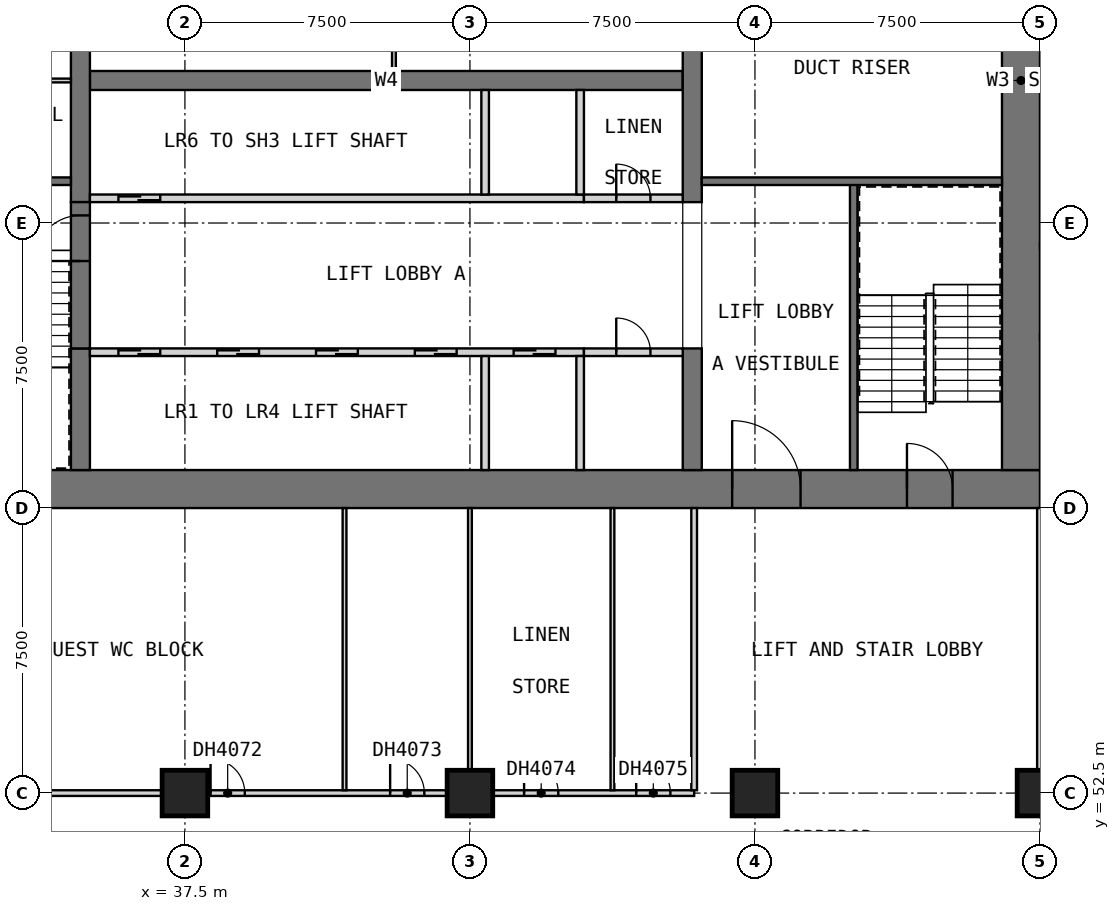
"""IFC4 building model, lengths in metres.
Left out: names, types, materials, properties, quantities, classifications, styles, units other than length and angle.
Written with IfcOpenShell. Run it as: python <this file> out.ifc"""

import sys

from ifc_helpers import new_model, si_unit, direction, frame, frame_2d, origin, origin_2d, place, context, subcontext, project, spatial, rectangle, extrude, element, fill, save


model = new_model("IFC4")
c1 = context("Model", 3, precision=1e-05, world=origin(), true_north=direction((0.0, 1.0)))
c2 = subcontext(c1, "Body", "Model", "MODEL_VIEW")
j1 = project(units=[si_unit("LENGTHUNIT", "METRE"), si_unit("PLANEANGLEUNIT", "RADIAN")], contexts=[c1])
p1 = place(None, origin())
s1 = spatial("IfcSite", under=j1, at=p1, CompositionType="ELEMENT")
p2 = place(p1, origin())
s2 = spatial("IfcBuilding", under=s1, at=p2, CompositionType="ELEMENT")
p3 = place(p2, frame((0.0, 0.0, 44.8)))
s3 = spatial("IfcBuildingStorey", under=s2, at=p3, CompositionType="ELEMENT", Elevation=44.8)
for number, where, z_axis, x_axis in (
    (1, (37.5, 52.5, 0.0), (0.0, 0.0, 1.0), (1.0, 0.0, 0.0)),
    (2, (45.0, 52.5, 0.0), (0.0, 0.0, 1.0), (1.0, 0.0, 0.0)),
    (3, (52.5, 52.5, 0.0), (0.0, 0.0, 1.0), (1.0, 0.0, 0.0)),
    (4, (60.0, 52.5, 0.0), (0.0, 0.0, 1.0), (1.0, 0.0, 0.0)),
):
    element("IfcColumn", number, at=place(p3, frame(where, z_axis=z_axis, x_axis=x_axis)), inside=s3, PredefinedType="COLUMN", context=c2, shape_type="SweptSolid", body=[
        extrude(rectangle(XDim=1.2, YDim=1.2, at=origin_2d()), origin(), (0.0, 0.0, 1.0), 3.6),
    ])
p4 = place(p3, frame((30.0, 60.5, 0.0), z_axis=(0.0, 0.0, 1.0), x_axis=(1.0, 0.0, 0.0)))
e5 = element("IfcWall", 5, at=p4, inside=s3, PredefinedType="SHEAR", context=c2, shape_type="SweptSolid", body=[
    extrude(rectangle(XDim=30.0, YDim=1.0, at=frame_2d((15.0, 0.0))), origin(), (0.0, 0.0, 1.0), 3.6),
])
p5 = place(p4, frame((21.9, 0.0, 0.0)))
e6 = element("IfcOpeningElement", 6, at=p5, cuts=e5, PredefinedType="OPENING", context=c2, shape_type="SweptSolid", body=[
    extrude(rectangle(XDim=1.8, YDim=2.1, at=frame_2d((0.9, 1.05))), frame((0.0, 0.51, 0.0), z_axis=(0.0, -1.0, 0.0), x_axis=(1.0, 0.0, 0.0)), (0.0, 0.0, 1.0), 1.02),
])
p6 = place(p4, frame((26.5, 0.0, 0.0)))
e7 = element("IfcOpeningElement", 7, at=p6, cuts=e5, PredefinedType="OPENING", context=c2, shape_type="SweptSolid", body=[
    extrude(rectangle(XDim=1.2, YDim=2.1, at=frame_2d((0.6, 1.05))), frame((0.0, 0.51, 0.0), z_axis=(0.0, -1.0, 0.0), x_axis=(1.0, 0.0, 0.0)), (0.0, 0.0, 1.0), 1.02),
])
p7 = place(p3, frame((59.5, 61.0, 0.0), z_axis=(0.0, 0.0, 1.0), x_axis=(0.0, 1.0, 0.0)))
e8 = element("IfcWall", 8, at=p7, inside=s3, PredefinedType="SHEAR", context=c2, shape_type="SweptSolid", body=[
    extrude(rectangle(XDim=20.5, YDim=1.0, at=frame_2d((10.25, 0.0))), origin(), (0.0, 0.0, 1.0), 3.6),
])
p8 = place(p7, frame((14.5, 0.0, 0.0)))
e9 = element("IfcOpeningElement", 9, at=p8, cuts=e8, PredefinedType="OPENING", context=c2, shape_type="SweptSolid", body=[
    extrude(rectangle(XDim=1.8, YDim=2.1, at=frame_2d((0.9, 1.05))), frame((0.0, 0.51, 0.0), z_axis=(0.0, -1.0, 0.0), x_axis=(1.0, 0.0, 0.0)), (0.0, 0.0, 1.0), 1.02),
])
p9 = place(p3, frame((35.0, 71.25, 0.0), z_axis=(0.0, 0.0, 1.0), x_axis=(1.0, 0.0, 0.0)))
e10 = element("IfcWall", 10, at=p9, inside=s3, PredefinedType="SHEAR", context=c2, shape_type="SweptSolid", body=[
    extrude(rectangle(XDim=15.6, YDim=0.5, at=frame_2d((7.8, 0.0))), origin(), (0.0, 0.0, 1.0), 3.6),
])
p10 = place(p3, frame((34.75, 61.0, 0.0), z_axis=(0.0, 0.0, 1.0), x_axis=(0.0, 1.0, 0.0)))
e11 = element("IfcWall", 11, at=p10, inside=s3, PredefinedType="SHEAR", context=c2, shape_type="SweptSolid", body=[
    extrude(rectangle(XDim=3.2, YDim=0.5, at=frame_2d((1.6, 0.0))), origin(), (0.0, 0.0, 1.0), 3.6),
])
p11 = place(p3, frame((34.75, 68.05, 0.0), z_axis=(0.0, 0.0, 1.0), x_axis=(0.0, 1.0, 0.0)))
e12 = element("IfcWall", 12, at=p11, inside=s3, PredefinedType="SHEAR", context=c2, shape_type="SweptSolid", body=[
    extrude(rectangle(XDim=6.4, YDim=0.5, at=frame_2d((3.2, 0.0))), origin(), (0.0, 0.0, 1.0), 3.6),
])
p12 = place(p3, frame((50.85, 61.0, 0.0), z_axis=(0.0, 0.0, 1.0), x_axis=(0.0, 1.0, 0.0)))
e13 = element("IfcWall", 13, at=p12, inside=s3, PredefinedType="SHEAR", context=c2, shape_type="SweptSolid", body=[
    extrude(rectangle(XDim=3.2, YDim=0.5, at=frame_2d((1.6, 0.0))), origin(), (0.0, 0.0, 1.0), 3.6),
])
p13 = place(p3, frame((50.85, 68.05, 0.0), z_axis=(0.0, 0.0, 1.0), x_axis=(0.0, 1.0, 0.0)))
e14 = element("IfcWall", 14, at=p13, inside=s3, PredefinedType="SHEAR", context=c2, shape_type="SweptSolid", body=[
    extrude(rectangle(XDim=6.4, YDim=0.5, at=frame_2d((3.2, 0.0))), origin(), (0.0, 0.0, 1.0), 3.6),
])
p14 = place(p3, frame((35.0, 64.1, 0.0), z_axis=(0.0, 0.0, 1.0), x_axis=(1.0, 0.0, 0.0)))
e15 = element("IfcWall", 15, at=p14, inside=s3, PredefinedType="SOLIDWALL", context=c2, shape_type="SweptSolid", body=[
    extrude(rectangle(XDim=13.0, YDim=0.2, at=frame_2d((6.5, 0.0))), origin(), (0.0, 0.0, 1.0), 3.6),
])
p15 = place(p14, frame((0.75, 0.0, 0.0)))
e16 = element("IfcOpeningElement", 16, at=p15, cuts=e15, PredefinedType="OPENING", context=c2, shape_type="SweptSolid", body=[
    extrude(rectangle(XDim=1.1, YDim=2.1, at=frame_2d((0.55, 1.05))), frame((0.0, 0.11, 0.0), z_axis=(0.0, -1.0, 0.0), x_axis=(1.0, 0.0, 0.0)), (0.0, 0.0, 1.0), 0.22),
])
p16 = place(p14, frame((3.35, 0.0, 0.0)))
e17 = element("IfcOpeningElement", 17, at=p16, cuts=e15, PredefinedType="OPENING", context=c2, shape_type="SweptSolid", body=[
    extrude(rectangle(XDim=1.1, YDim=2.1, at=frame_2d((0.55, 1.05))), frame((0.0, 0.11, 0.0), z_axis=(0.0, -1.0, 0.0), x_axis=(1.0, 0.0, 0.0)), (0.0, 0.0, 1.0), 0.22),
])
p17 = place(p14, frame((5.95, 0.0, 0.0)))
e18 = element("IfcOpeningElement", 18, at=p17, cuts=e15, PredefinedType="OPENING", context=c2, shape_type="SweptSolid", body=[
    extrude(rectangle(XDim=1.1, YDim=2.1, at=frame_2d((0.55, 1.05))), frame((0.0, 0.11, 0.0), z_axis=(0.0, -1.0, 0.0), x_axis=(1.0, 0.0, 0.0)), (0.0, 0.0, 1.0), 0.22),
])
p18 = place(p14, frame((8.55, 0.0, 0.0)))
e19 = element("IfcOpeningElement", 19, at=p18, cuts=e15, PredefinedType="OPENING", context=c2, shape_type="SweptSolid", body=[
    extrude(rectangle(XDim=1.1, YDim=2.1, at=frame_2d((0.55, 1.05))), frame((0.0, 0.11, 0.0), z_axis=(0.0, -1.0, 0.0), x_axis=(1.0, 0.0, 0.0)), (0.0, 0.0, 1.0), 0.22),
])
p19 = place(p14, frame((11.15, 0.0, 0.0)))
e20 = element("IfcOpeningElement", 20, at=p19, cuts=e15, PredefinedType="OPENING", context=c2, shape_type="SweptSolid", body=[
    extrude(rectangle(XDim=1.1, YDim=2.1, at=frame_2d((0.55, 1.05))), frame((0.0, 0.11, 0.0), z_axis=(0.0, -1.0, 0.0), x_axis=(1.0, 0.0, 0.0)), (0.0, 0.0, 1.0), 0.22),
])
for number, where, z_axis, x_axis in (
    (21, (45.4, 61.0, 0.0), (0.0, 0.0, 1.0), (0.0, 1.0, 0.0)),
    (22, (47.9, 61.0, 0.0), (0.0, 0.0, 1.0), (0.0, 1.0, 0.0)),
):
    element("IfcWall", number, at=place(p3, frame(where, z_axis=z_axis, x_axis=x_axis)), inside=s3, PredefinedType="SOLIDWALL", context=c2, shape_type="SweptSolid", body=[
        extrude(rectangle(XDim=3.0, YDim=0.2, at=frame_2d((1.5, 0.0))), origin(), (0.0, 0.0, 1.0), 3.6),
    ])
p20 = place(p3, frame((48.0, 64.1, 0.0), z_axis=(0.0, 0.0, 1.0), x_axis=(1.0, 0.0, 0.0)))
e23 = element("IfcWall", 23, at=p20, inside=s3, PredefinedType="PARTITIONING", context=c2, shape_type="SweptSolid", body=[
    extrude(rectangle(XDim=2.6, YDim=0.2, at=frame_2d((1.3, 0.0))), origin(), (0.0, 0.0, 1.0), 3.35),
])
p21 = place(p20, frame((0.85, 0.0, 0.0)))
e24 = element("IfcOpeningElement", 24, at=p21, cuts=e23, PredefinedType="OPENING", context=c2, shape_type="SweptSolid", body=[
    extrude(rectangle(XDim=0.9, YDim=2.1, at=frame_2d((0.45, 1.05))), frame((0.0, 0.11, 0.0), z_axis=(0.0, -1.0, 0.0), x_axis=(1.0, 0.0, 0.0)), (0.0, 0.0, 1.0), 0.22),
])
p22 = place(p3, frame((35.0, 68.15, 0.0), z_axis=(0.0, 0.0, 1.0), x_axis=(1.0, 0.0, 0.0)))
e25 = element("IfcWall", 25, at=p22, inside=s3, PredefinedType="SOLIDWALL", context=c2, shape_type="SweptSolid", body=[
    extrude(rectangle(XDim=13.0, YDim=0.2, at=frame_2d((6.5, 0.0))), origin(), (0.0, 0.0, 1.0), 3.6),
])
p23 = place(p22, frame((0.75, 0.0, 0.0)))
e26 = element("IfcOpeningElement", 26, at=p23, cuts=e25, PredefinedType="OPENING", context=c2, shape_type="SweptSolid", body=[
    extrude(rectangle(XDim=1.1, YDim=2.1, at=frame_2d((0.55, 1.05))), frame((0.0, 0.11, 0.0), z_axis=(0.0, -1.0, 0.0), x_axis=(1.0, 0.0, 0.0)), (0.0, 0.0, 1.0), 0.22),
])
for number, where, z_axis, x_axis in (
    (27, (45.4, 68.25, 0.0), (0.0, 0.0, 1.0), (0.0, 1.0, 0.0)),
    (28, (47.9, 68.25, 0.0), (0.0, 0.0, 1.0), (0.0, 1.0, 0.0)),
):
    element("IfcWall", number, at=place(p3, frame(where, z_axis=z_axis, x_axis=x_axis)), inside=s3, PredefinedType="SOLIDWALL", context=c2, shape_type="SweptSolid", body=[
        extrude(rectangle(XDim=2.75, YDim=0.2, at=frame_2d((1.375, 0.0))), origin(), (0.0, 0.0, 1.0), 3.6),
    ])
p24 = place(p3, frame((48.0, 68.15, 0.0), z_axis=(0.0, 0.0, 1.0), x_axis=(1.0, 0.0, 0.0)))
e29 = element("IfcWall", 29, at=p24, inside=s3, PredefinedType="PARTITIONING", context=c2, shape_type="SweptSolid", body=[
    extrude(rectangle(XDim=2.6, YDim=0.2, at=frame_2d((1.3, 0.0))), origin(), (0.0, 0.0, 1.0), 3.35),
])
p25 = place(p24, frame((0.85, 0.0, 0.0)))
e30 = element("IfcOpeningElement", 30, at=p25, cuts=e29, PredefinedType="OPENING", context=c2, shape_type="SweptSolid", body=[
    extrude(rectangle(XDim=0.9, YDim=2.1, at=frame_2d((0.45, 1.05))), frame((0.0, 0.11, 0.0), z_axis=(0.0, -1.0, 0.0), x_axis=(1.0, 0.0, 0.0)), (0.0, 0.0, 1.0), 0.22),
])
p26 = place(p3, frame((43.0, 71.5, 0.0), z_axis=(0.0, 0.0, 1.0), x_axis=(0.0, 1.0, 0.0)))
e31 = element("IfcWall", 31, at=p26, inside=s3, PredefinedType="PARTITIONING", context=c2, shape_type="SweptSolid", body=[
    extrude(rectangle(XDim=2.0, YDim=0.1, at=frame_2d((1.0, 0.0))), origin(), (0.0, 0.0, 1.0), 3.35),
])
p27 = place(p3, frame((34.75, 64.2, 0.0), z_axis=(0.0, 0.0, 1.0), x_axis=(0.0, 1.0, 0.0)))
e32 = element("IfcWall", 32, at=p27, inside=s3, PredefinedType="SOLIDWALL", context=c2, shape_type="SweptSolid", body=[
    extrude(rectangle(XDim=3.85, YDim=0.5, at=frame_2d((1.925, 0.0))), origin(), (0.0, 0.0, 1.0), 2.4),
])
p28 = place(p27, frame((2.3, 0.0, 0.0)))
e33 = element("IfcOpeningElement", 33, at=p28, cuts=e32, PredefinedType="OPENING", context=c2, shape_type="SweptSolid", body=[
    extrude(rectangle(XDim=1.2, YDim=2.1, at=frame_2d((0.6, 1.05))), frame((0.0, 0.26, 0.0), z_axis=(0.0, -1.0, 0.0), x_axis=(1.0, 0.0, 0.0)), (0.0, 0.0, 1.0), 0.52),
])
p29 = place(p3, frame((31.0, 68.6, 0.0), z_axis=(0.0, 0.0, 1.0), x_axis=(1.0, 0.0, 0.0)))
e34 = element("IfcWall", 34, at=p29, inside=s3, PredefinedType="SOLIDWALL", context=c2, shape_type="SweptSolid", body=[
    extrude(rectangle(XDim=3.5, YDim=0.2, at=frame_2d((1.75, 0.0))), origin(), (0.0, 0.0, 1.0), 3.35),
])
p30 = place(p29, frame((1.3, 0.0, 0.0)))
e35 = element("IfcOpeningElement", 35, at=p30, cuts=e34, PredefinedType="OPENING", context=c2, shape_type="SweptSolid", body=[
    extrude(rectangle(XDim=0.9, YDim=2.1, at=frame_2d((0.45, 1.05))), frame((0.0, 0.11, 0.0), z_axis=(0.0, -1.0, 0.0), x_axis=(1.0, 0.0, 0.0)), (0.0, 0.0, 1.0), 0.22),
])
p31 = place(p3, frame((55.1, 61.0, 0.0), z_axis=(0.0, 0.0, 1.0), x_axis=(0.0, 1.0, 0.0)))
e36 = element("IfcWall", 36, at=p31, inside=s3, PredefinedType="SOLIDWALL", context=c2, shape_type="SweptSolid", body=[
    extrude(rectangle(XDim=7.6, YDim=0.2, at=frame_2d((3.8, 0.0))), origin(), (0.0, 0.0, 1.0), 3.35),
])
p32 = place(p3, frame((51.1, 68.6, 0.0), z_axis=(0.0, 0.0, 1.0), x_axis=(1.0, 0.0, 0.0)))
e37 = element("IfcWall", 37, at=p32, inside=s3, PredefinedType="SOLIDWALL", context=c2, shape_type="SweptSolid", body=[
    extrude(rectangle(XDim=7.9, YDim=0.2, at=frame_2d((3.95, 0.0))), origin(), (0.0, 0.0, 1.0), 3.35),
])
p33 = place(p3, frame((31.0, 71.25, 0.0), z_axis=(0.0, 0.0, 1.0), x_axis=(1.0, 0.0, 0.0)))
e38 = element("IfcWall", 38, at=p33, inside=s3, PredefinedType="PARTITIONING", context=c2, shape_type="SweptSolid", body=[
    extrude(rectangle(XDim=3.5, YDim=0.1, at=frame_2d((1.75, 0.0))), origin(), (0.0, 0.0, 1.0), 3.35),
])
p34 = place(p3, frame((33.75, 52.5, 0.0), z_axis=(0.0, 0.0, 1.0), x_axis=(1.0, 0.0, 0.0)))
e39 = element("IfcWall", 39, at=p34, inside=s3, PredefinedType="PARTITIONING", context=c2, shape_type="SweptSolid", body=[
    extrude(rectangle(XDim=17.15, YDim=0.15, at=frame_2d((8.575, 0.0))), origin(), (0.0, 0.0, 1.0), 3.35),
])
p35 = place(p34, frame((4.425, 0.0, 0.0)))
e40 = element("IfcOpeningElement", 40, at=p35, cuts=e39, PredefinedType="OPENING", context=c2, shape_type="SweptSolid", body=[
    extrude(rectangle(XDim=0.9, YDim=2.1, at=frame_2d((0.45, 1.05))), frame((0.0, 0.085, 0.0), z_axis=(0.0, -1.0, 0.0), x_axis=(1.0, 0.0, 0.0)), (0.0, 0.0, 1.0), 0.17),
])
p36 = place(p34, frame((9.15, 0.0, 0.0)))
e41 = element("IfcOpeningElement", 41, at=p36, cuts=e39, PredefinedType="OPENING", context=c2, shape_type="SweptSolid", body=[
    extrude(rectangle(XDim=0.9, YDim=2.1, at=frame_2d((0.45, 1.05))), frame((0.0, 0.085, 0.0), z_axis=(0.0, -1.0, 0.0), x_axis=(1.0, 0.0, 0.0)), (0.0, 0.0, 1.0), 0.17),
])
p37 = place(p34, frame((12.675, 0.0, 0.0)))
e42 = element("IfcOpeningElement", 42, at=p37, cuts=e39, PredefinedType="OPENING", context=c2, shape_type="SweptSolid", body=[
    extrude(rectangle(XDim=0.9, YDim=2.1, at=frame_2d((0.45, 1.05))), frame((0.0, 0.085, 0.0), z_axis=(0.0, -1.0, 0.0), x_axis=(1.0, 0.0, 0.0)), (0.0, 0.0, 1.0), 0.17),
])
p38 = place(p34, frame((15.625, 0.0, 0.0)))
e43 = element("IfcOpeningElement", 43, at=p38, cuts=e39, PredefinedType="OPENING", context=c2, shape_type="SweptSolid", body=[
    extrude(rectangle(XDim=0.9, YDim=2.1, at=frame_2d((0.45, 1.05))), frame((0.0, 0.085, 0.0), z_axis=(0.0, -1.0, 0.0), x_axis=(1.0, 0.0, 0.0)), (0.0, 0.0, 1.0), 0.17),
])
for number, where, z_axis, x_axis in (
    (44, (41.7, 52.575, 0.0), (0.0, 0.0, 1.0), (0.0, 1.0, 0.0)),
    (45, (45.0, 52.575, 0.0), (0.0, 0.0, 1.0), (0.0, 1.0, 0.0)),
    (46, (48.75, 52.575, 0.0), (0.0, 0.0, 1.0), (0.0, 1.0, 0.0)),
):
    element("IfcWall", number, at=place(p3, frame(where, z_axis=z_axis, x_axis=x_axis)), inside=s3, PredefinedType="PARTITIONING", context=c2, shape_type="SweptSolid", body=[
        extrude(rectangle(XDim=7.425, YDim=0.1, at=frame_2d((3.712, 0.0))), origin(), (0.0, 0.0, 1.0), 3.35),
    ])
for number, where, z_axis, x_axis in (
    (47, (50.9, 52.575, 0.0), (0.0, 0.0, 1.0), (0.0, 1.0, 0.0)),
    (48, (60.0, 52.575, 0.0), (0.0, 0.0, 1.0), (0.0, 1.0, 0.0)),
):
    element("IfcWall", number, at=place(p3, frame(where, z_axis=z_axis, x_axis=x_axis)), inside=s3, PredefinedType="PARTITIONING", context=c2, shape_type="SweptSolid", body=[
        extrude(rectangle(XDim=7.425, YDim=0.15, at=frame_2d((3.712, 0.0))), origin(), (0.0, 0.0, 1.0), 3.35),
    ])
p39 = place(p15, origin())
e49 = element("IfcDoor", 49, at=p39, inside=s3, OperationType="DOUBLE_DOOR_SLIDING", PredefinedType="DOOR", context=c2, shape_type="SweptSolid", body=[
    extrude(rectangle(XDim=1.1, YDim=2.1, at=frame_2d((0.55, 1.05))), frame((0.0, 0.025, 0.0), z_axis=(0.0, -1.0, 0.0), x_axis=(1.0, 0.0, 0.0)), (0.0, 0.0, 1.0), 0.05),
])
fill(e16, e49)
p40 = place(p16, origin())
e50 = element("IfcDoor", 50, at=p40, inside=s3, OperationType="DOUBLE_DOOR_SLIDING", PredefinedType="DOOR", context=c2, shape_type="SweptSolid", body=[
    extrude(rectangle(XDim=1.1, YDim=2.1, at=frame_2d((0.55, 1.05))), frame((0.0, 0.025, 0.0), z_axis=(0.0, -1.0, 0.0), x_axis=(1.0, 0.0, 0.0)), (0.0, 0.0, 1.0), 0.05),
])
fill(e17, e50)
p41 = place(p17, origin())
e51 = element("IfcDoor", 51, at=p41, inside=s3, OperationType="DOUBLE_DOOR_SLIDING", PredefinedType="DOOR", context=c2, shape_type="SweptSolid", body=[
    extrude(rectangle(XDim=1.1, YDim=2.1, at=frame_2d((0.55, 1.05))), frame((0.0, 0.025, 0.0), z_axis=(0.0, -1.0, 0.0), x_axis=(1.0, 0.0, 0.0)), (0.0, 0.0, 1.0), 0.05),
])
fill(e18, e51)
p42 = place(p18, origin())
e52 = element("IfcDoor", 52, at=p42, inside=s3, OperationType="DOUBLE_DOOR_SLIDING", PredefinedType="DOOR", context=c2, shape_type="SweptSolid", body=[
    extrude(rectangle(XDim=1.1, YDim=2.1, at=frame_2d((0.55, 1.05))), frame((0.0, 0.025, 0.0), z_axis=(0.0, -1.0, 0.0), x_axis=(1.0, 0.0, 0.0)), (0.0, 0.0, 1.0), 0.05),
])
fill(e19, e52)
p43 = place(p19, origin())
e53 = element("IfcDoor", 53, at=p43, inside=s3, OperationType="DOUBLE_DOOR_SLIDING", PredefinedType="DOOR", context=c2, shape_type="SweptSolid", body=[
    extrude(rectangle(XDim=1.1, YDim=2.1, at=frame_2d((0.55, 1.05))), frame((0.0, 0.025, 0.0), z_axis=(0.0, -1.0, 0.0), x_axis=(1.0, 0.0, 0.0)), (0.0, 0.0, 1.0), 0.05),
])
fill(e20, e53)
p44 = place(p21, origin())
e54 = element("IfcDoor", 54, at=p44, inside=s3, OperationType="SINGLE_SWING_LEFT", PredefinedType="DOOR", context=c2, shape_type="SweptSolid", body=[
    extrude(rectangle(XDim=0.9, YDim=2.1, at=frame_2d((0.45, 1.05))), frame((0.0, 0.025, 0.0), z_axis=(0.0, -1.0, 0.0), x_axis=(1.0, 0.0, 0.0)), (0.0, 0.0, 1.0), 0.05),
])
fill(e24, e54)
p45 = place(p23, origin())
e55 = element("IfcDoor", 55, at=p45, inside=s3, OperationType="DOUBLE_DOOR_SLIDING", PredefinedType="DOOR", context=c2, shape_type="SweptSolid", body=[
    extrude(rectangle(XDim=1.1, YDim=2.1, at=frame_2d((0.55, 1.05))), frame((0.0, 0.025, 0.0), z_axis=(0.0, -1.0, 0.0), x_axis=(1.0, 0.0, 0.0)), (0.0, 0.0, 1.0), 0.05),
])
fill(e26, e55)
p46 = place(p25, origin())
e56 = element("IfcDoor", 56, at=p46, inside=s3, OperationType="SINGLE_SWING_LEFT", PredefinedType="DOOR", context=c2, shape_type="SweptSolid", body=[
    extrude(rectangle(XDim=0.9, YDim=2.1, at=frame_2d((0.45, 1.05))), frame((0.0, 0.025, 0.0), z_axis=(0.0, -1.0, 0.0), x_axis=(1.0, 0.0, 0.0)), (0.0, 0.0, 1.0), 0.05),
])
fill(e30, e56)
p47 = place(p5, origin())
e57 = element("IfcDoor", 57, at=p47, inside=s3, OperationType="DOUBLE_DOOR_SINGLE_SWING", PredefinedType="DOOR", context=c2, shape_type="SweptSolid", body=[
    extrude(rectangle(XDim=1.8, YDim=2.1, at=frame_2d((0.9, 1.05))), frame((0.0, 0.025, 0.0), z_axis=(0.0, -1.0, 0.0), x_axis=(1.0, 0.0, 0.0)), (0.0, 0.0, 1.0), 0.05),
])
fill(e6, e57)
p48 = place(p28, origin())
e58 = element("IfcDoor", 58, at=p48, inside=s3, OperationType="SINGLE_SWING_LEFT", PredefinedType="DOOR", context=c2, shape_type="SweptSolid", body=[
    extrude(rectangle(XDim=1.2, YDim=2.1, at=frame_2d((0.6, 1.05))), frame((0.0, 0.025, 0.0), z_axis=(0.0, -1.0, 0.0), x_axis=(1.0, 0.0, 0.0)), (0.0, 0.0, 1.0), 0.05),
])
fill(e33, e58)
p49 = place(p6, origin())
e59 = element("IfcDoor", 59, at=p49, inside=s3, OperationType="SINGLE_SWING_LEFT", PredefinedType="DOOR", context=c2, shape_type="SweptSolid", body=[
    extrude(rectangle(XDim=1.2, YDim=2.1, at=frame_2d((0.6, 1.05))), frame((0.0, 0.025, 0.0), z_axis=(0.0, -1.0, 0.0), x_axis=(1.0, 0.0, 0.0)), (0.0, 0.0, 1.0), 0.05),
])
fill(e7, e59)
p50 = place(p35, origin())
e60 = element("IfcDoor", 60, at=p50, inside=s3, OperationType="SINGLE_SWING_RIGHT", PredefinedType="DOOR", context=c2, shape_type="SweptSolid", body=[
    extrude(rectangle(XDim=0.9, YDim=2.1, at=frame_2d((0.45, 1.05))), frame((0.0, 0.025, 0.0), z_axis=(0.0, -1.0, 0.0), x_axis=(1.0, 0.0, 0.0)), (0.0, 0.0, 1.0), 0.05),
])
fill(e40, e60)
p51 = place(p36, origin())
e61 = element("IfcDoor", 61, at=p51, inside=s3, OperationType="SINGLE_SWING_LEFT", PredefinedType="DOOR", context=c2, shape_type="SweptSolid", body=[
    extrude(rectangle(XDim=0.9, YDim=2.1, at=frame_2d((0.45, 1.05))), frame((0.0, 0.025, 0.0), z_axis=(0.0, -1.0, 0.0), x_axis=(1.0, 0.0, 0.0)), (0.0, 0.0, 1.0), 0.05),
])
fill(e41, e61)
p52 = place(p37, origin())
e62 = element("IfcDoor", 62, at=p52, inside=s3, OperationType="SINGLE_SWING_LEFT", PredefinedType="DOOR", context=c2, shape_type="SweptSolid", body=[
    extrude(rectangle(XDim=0.9, YDim=2.1, at=frame_2d((0.45, 1.05))), frame((0.0, 0.025, 0.0), z_axis=(0.0, -1.0, 0.0), x_axis=(1.0, 0.0, 0.0)), (0.0, 0.0, 1.0), 0.05),
])
fill(e42, e62)
p53 = place(p38, origin())
e63 = element("IfcDoor", 63, at=p53, inside=s3, OperationType="SINGLE_SWING_LEFT", PredefinedType="DOOR", context=c2, shape_type="SweptSolid", body=[
    extrude(rectangle(XDim=0.9, YDim=2.1, at=frame_2d((0.45, 1.05))), frame((0.0, 0.025, 0.0), z_axis=(0.0, -1.0, 0.0), x_axis=(1.0, 0.0, 0.0)), (0.0, 0.0, 1.0), 0.05),
])
fill(e43, e63)
save(model, sys.argv[1])
